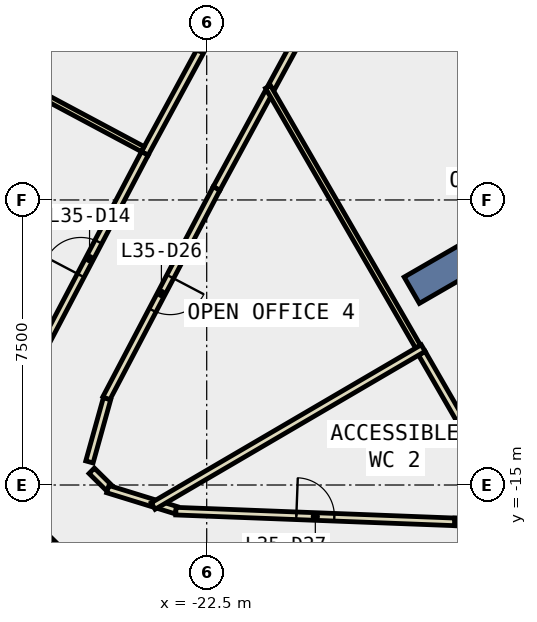
"""IFC4 building model, lengths in metres.
Left out: names, types, materials, properties, quantities, classifications, styles, units other than length and angle.
Written with IfcOpenShell. Run it as: python <this file> out.ifc"""

import sys

from ifc_helpers import new_model, si_unit, direction, frame, frame_2d, origin, place, context, subcontext, project, spatial, rectangle, extrude, element, fill, save


model = new_model("IFC4")
c1 = context("Model", 3, precision=1e-05, world=origin(), true_north=direction((0.0, 1.0)))
c2 = subcontext(c1, "Body", "Model", "MODEL_VIEW")
j1 = project(units=[si_unit("LENGTHUNIT", "METRE"), si_unit("PLANEANGLEUNIT", "RADIAN")], contexts=[c1])
p1 = place(None, origin())
s1 = spatial("IfcSite", under=j1, at=p1, CompositionType="ELEMENT")
p2 = place(p1, origin())
s2 = spatial("IfcBuilding", under=s1, at=p2, CompositionType="ELEMENT")
p3 = place(p2, frame((0.0, 0.0, 159.2)))
s3 = spatial("IfcBuildingStorey", under=s2, at=p3, CompositionType="ELEMENT", Elevation=159.2)
p4 = place(p3, frame((-9.31, -5.375, -0.4), z_axis=(0.0, 0.0, 1.0), x_axis=(-0.866017533419, -0.500013631625, 0.0)))
e1 = element("IfcWall", 1, at=p4, inside=s3, PredefinedType="SHEAR", context=c2, shape_type="SweptSolid", body=[
    extrude(rectangle(XDim=9.0, YDim=0.8, at=frame_2d((4.5, 0.0))), origin(), (0.0, 0.0, 1.0), 4.2),
])
p5 = place(p3, frame((-18.93, -1.095, 0.0), z_axis=(0.0, 0.0, 1.0), x_axis=(-0.476854303058, -0.878982351162, 0.0)))
e2 = element("IfcWall", 2, at=p5, inside=s3, PredefinedType="PARTITIONING", context=c2, shape_type="SweptSolid", body=[
    extrude(rectangle(XDim=3.924, YDim=0.2, at=frame_2d((1.962, 0.0))), origin(), (0.0, 0.0, 1.0), 3.8),
])
p6 = place(p3, frame((-20.873, -4.676, 0.0), z_axis=(0.0, 0.0, 1.0), x_axis=(-0.476781985736, -0.879021579984, 0.0)))
e3 = element("IfcWall", 3, at=p6, inside=s3, PredefinedType="PARTITIONING", context=c2, shape_type="SweptSolid", body=[
    extrude(rectangle(XDim=2.869, YDim=0.2, at=frame_2d((1.435, 0.0))), origin(), (0.0, 0.0, 1.0), 3.8),
])
p7 = place(p3, frame((-22.241, -7.198, 0.0), z_axis=(0.0, 0.0, 1.0), x_axis=(-0.465089990515, -0.885263407536, 0.0)))
e4 = element("IfcWall", 4, at=p7, inside=s3, PredefinedType="PARTITIONING", context=c2, shape_type="SweptSolid", body=[
    extrude(rectangle(XDim=6.24, YDim=0.2, at=frame_2d((3.12, 0.0))), origin(), (0.0, 0.0, 1.0), 3.8),
])
p8 = place(p7, frame((2.62, 0.0, 0.0)))
e5 = element("IfcOpeningElement", 5, at=p8, cuts=e4, PredefinedType="OPENING", context=c2, shape_type="SweptSolid", body=[
    extrude(rectangle(XDim=1.0, YDim=2.1, at=frame_2d((0.5, 1.05))), frame((0.0, 0.11, 0.0), z_axis=(0.0, -1.0, 0.0), x_axis=(1.0, 0.0, 0.0)), (0.0, 0.0, 1.0), 0.22),
])
p9 = place(p3, frame((-25.123, -12.73, 0.0), z_axis=(0.0, 0.0, 1.0), x_axis=(-0.268139825244, -0.963380005044, 0.0)))
e6 = element("IfcWall", 6, at=p9, inside=s3, PredefinedType="PARTITIONING", context=c2, shape_type="SweptSolid", body=[
    extrude(rectangle(XDim=1.726, YDim=0.2, at=frame_2d((0.863, 0.0))), origin(), (0.0, 0.0, 1.0), 3.8),
])
p10 = place(p3, frame((-25.526, -14.626, 0.0), z_axis=(0.0, 0.0, 1.0), x_axis=(0.711758647644, -0.702424108003, 0.0)))
e7 = element("IfcWall", 7, at=p10, inside=s3, PredefinedType="PARTITIONING", context=c2, shape_type="SweptSolid", body=[
    extrude(rectangle(XDim=0.628, YDim=0.2, at=frame_2d((0.314, 0.0))), origin(), (0.0, 0.0, 1.0), 3.8),
])
p11 = place(p3, frame((-25.103, -15.108, 0.0), z_axis=(0.0, 0.0, 1.0), x_axis=(0.955420813731, -0.295247470251, 0.0)))
e8 = element("IfcWall", 8, at=p11, inside=s3, PredefinedType="PARTITIONING", context=c2, shape_type="SweptSolid", body=[
    extrude(rectangle(XDim=1.24, YDim=0.2, at=frame_2d((0.62, 0.0))), origin(), (0.0, 0.0, 1.0), 3.8),
])
p12 = place(p3, frame((-23.727, -15.532, 0.0), z_axis=(0.0, 0.0, 1.0), x_axis=(0.955237350621, -0.295840504289, 0.0)))
e9 = element("IfcWall", 9, at=p12, inside=s3, PredefinedType="PARTITIONING", context=c2, shape_type="SweptSolid", body=[
    extrude(rectangle(XDim=0.44, YDim=0.2, at=frame_2d((0.22, 0.0))), origin(), (0.0, 0.0, 1.0), 3.8),
])
p13 = place(p3, frame((-23.311, -15.688, 0.0), z_axis=(0.0, 0.0, 1.0), x_axis=(0.999262695969, -0.038393546916, 0.0)))
e10 = element("IfcWall", 10, at=p13, inside=s3, PredefinedType="PARTITIONING", context=c2, shape_type="SweptSolid", body=[
    extrude(rectangle(XDim=7.344, YDim=0.2, at=frame_2d((3.672, 0.0))), origin(), (0.0, 0.0, 1.0), 3.8),
])
p14 = place(p13, frame((3.172, 0.0, 0.0)))
e11 = element("IfcOpeningElement", 11, at=p14, cuts=e10, PredefinedType="OPENING", context=c2, shape_type="SweptSolid", body=[
    extrude(rectangle(XDim=1.0, YDim=2.1, at=frame_2d((0.5, 1.05))), frame((0.0, 0.11, 0.0), z_axis=(0.0, -1.0, 0.0), x_axis=(1.0, 0.0, 0.0)), (0.0, 0.0, 1.0), 0.22),
])
p15 = place(p3, frame((-15.972, -15.97, 0.0), z_axis=(0.0, 0.0, 1.0), x_axis=(0.999750111735, -0.022354285623, 0.0)))
e12 = element("IfcWall", 12, at=p15, inside=s3, PredefinedType="PARTITIONING", context=c2, shape_type="SweptSolid", body=[
    extrude(rectangle(XDim=1.616, YDim=0.2, at=frame_2d((0.808, 0.0))), origin(), (0.0, 0.0, 1.0), 3.8),
])
p16 = place(p3, frame((-24.13, -6.275, 0.0), z_axis=(0.0, 0.0, 1.0), x_axis=(0.476981750532, 0.878913198023, 0.0)))
e13 = element("IfcWall", 13, at=p16, inside=s3, PredefinedType="PARTITIONING", context=c2, shape_type="SweptSolid", body=[
    extrude(rectangle(XDim=7.046, YDim=0.2, at=frame_2d((3.523, 0.0))), origin(), (0.0, 0.0, 1.0), 3.8),
])
p17 = place(p16, frame((3.023, 0.0, 0.0)))
e14 = element("IfcOpeningElement", 14, at=p17, cuts=e13, PredefinedType="OPENING", context=c2, shape_type="SweptSolid", body=[
    extrude(rectangle(XDim=1.0, YDim=2.1, at=frame_2d((0.5, 1.05))), frame((0.0, 0.11, 0.0), z_axis=(0.0, -1.0, 0.0), x_axis=(1.0, 0.0, 0.0)), (0.0, 0.0, 1.0), 0.22),
])
p18 = place(p3, frame((-27.106, -11.944, 0.0), z_axis=(0.0, 0.0, 1.0), x_axis=(0.464985599417, 0.885318243534, 0.0)))
e15 = element("IfcWall", 15, at=p18, inside=s3, PredefinedType="PARTITIONING", context=c2, shape_type="SweptSolid", body=[
    extrude(rectangle(XDim=6.402, YDim=0.2, at=frame_2d((3.201, 0.0))), origin(), (0.0, 0.0, 1.0), 3.8),
])
p19 = place(p18, frame((2.776, 0.0, 0.0)))
e16 = element("IfcOpeningElement", 16, at=p19, cuts=e15, PredefinedType="OPENING", context=c2, shape_type="SweptSolid", body=[
    extrude(rectangle(XDim=1.0, YDim=2.1, at=frame_2d((0.5, 1.05))), frame((0.0, 0.11, 0.0), z_axis=(0.0, -1.0, 0.0), x_axis=(1.0, 0.0, 0.0)), (0.0, 0.0, 1.0), 0.22),
])
p20 = place(p3, frame((-26.188, -16.922, 0.0), z_axis=(0.0, 0.0, 1.0), x_axis=(-0.712339678389, 0.701834868465, 0.0)))
e17 = element("IfcWall", 17, at=p20, inside=s3, PredefinedType="PARTITIONING", context=c2, shape_type="SweptSolid", body=[
    extrude(rectangle(XDim=1.72, YDim=0.2, at=frame_2d((0.86, 0.0))), origin(), (0.0, 0.0, 1.0), 3.8),
])
p21 = place(p3, frame((-16.939, -11.36, 0.0), z_axis=(0.0, 0.0, 1.0), x_axis=(-0.500053473428, 0.865994528685, 0.0)))
e18 = element("IfcWall", 18, at=p21, inside=s3, PredefinedType="PARTITIONING", context=c2, shape_type="SweptSolid", body=[
    extrude(rectangle(XDim=7.895, YDim=0.15, at=frame_2d((3.948, 0.0))), origin(), (0.0, 0.0, 1.0), 3.8),
])
p22 = place(p3, frame((-15.18, -14.408, 0.0), z_axis=(0.0, 0.0, 1.0), x_axis=(-0.499968694491, 0.866043477274, 0.0)))
e19 = element("IfcWall", 19, at=p22, inside=s3, PredefinedType="PARTITIONING", context=c2, shape_type="SweptSolid", body=[
    extrude(rectangle(XDim=3.319, YDim=0.2, at=frame_2d((1.659, 0.0))), origin(), (0.0, 0.0, 1.0), 3.8),
])
p23 = place(p3, frame((-16.803, -11.397, 0.0), z_axis=(0.0, 0.0, 1.0), x_axis=(-0.863203941699, -0.504855380318, 0.0)))
e20 = element("IfcWall", 20, at=p23, inside=s3, PredefinedType="PARTITIONING", context=c2, shape_type="SweptSolid", body=[
    extrude(rectangle(XDim=8.232, YDim=0.2, at=frame_2d((4.116, 0.0))), origin(), (0.0, 0.0, 1.0), 3.8),
])
p24 = place(p3, frame((-24.182, -6.162, 0.0), z_axis=(0.0, 0.0, 1.0), x_axis=(-0.88214427755, 0.470979270866, 0.0)))
e21 = element("IfcWall", 21, at=p24, inside=s3, PredefinedType="PARTITIONING", context=c2, shape_type="SweptSolid", body=[
    extrude(rectangle(XDim=4.731, YDim=0.15, at=frame_2d((2.365, 0.0))), origin(), (0.0, 0.0, 1.0), 3.8),
])
p25 = place(p17, origin())
e22 = element("IfcDoor", 22, at=p25, inside=s3, OperationType="SINGLE_SWING_RIGHT", PredefinedType="DOOR", context=c2, shape_type="SweptSolid", body=[
    extrude(rectangle(XDim=1.0, YDim=2.1, at=frame_2d((0.5, 1.05))), frame((0.0, 0.025, 0.0), z_axis=(0.0, -1.0, 0.0), x_axis=(1.0, 0.0, 0.0)), (0.0, 0.0, 1.0), 0.05),
])
fill(e14, e22)
p26 = place(p19, origin())
e23 = element("IfcDoor", 23, at=p26, inside=s3, OperationType="SINGLE_SWING_LEFT", PredefinedType="DOOR", context=c2, shape_type="SweptSolid", body=[
    extrude(rectangle(XDim=1.0, YDim=2.1, at=frame_2d((0.5, 1.05))), frame((0.0, 0.025, 0.0), z_axis=(0.0, -1.0, 0.0), x_axis=(1.0, 0.0, 0.0)), (0.0, 0.0, 1.0), 0.05),
])
fill(e16, e23)
p27 = place(p8, origin())
e24 = element("IfcDoor", 24, at=p27, inside=s3, OperationType="SINGLE_SWING_LEFT", PredefinedType="DOOR", context=c2, shape_type="SweptSolid", body=[
    extrude(rectangle(XDim=1.0, YDim=2.1, at=frame_2d((0.5, 1.05))), frame((0.0, 0.025, 0.0), z_axis=(0.0, -1.0, 0.0), x_axis=(1.0, 0.0, 0.0)), (0.0, 0.0, 1.0), 0.05),
])
fill(e5, e24)
p28 = place(p14, origin())
e25 = element("IfcDoor", 25, at=p28, inside=s3, OperationType="SINGLE_SWING_RIGHT", PredefinedType="DOOR", context=c2, shape_type="SweptSolid", body=[
    extrude(rectangle(XDim=1.0, YDim=2.1, at=frame_2d((0.5, 1.05))), frame((0.0, 0.025, 0.0), z_axis=(0.0, -1.0, 0.0), x_axis=(1.0, 0.0, 0.0)), (0.0, 0.0, 1.0), 0.05),
])
fill(e11, e25)
save(model, sys.argv[1])
